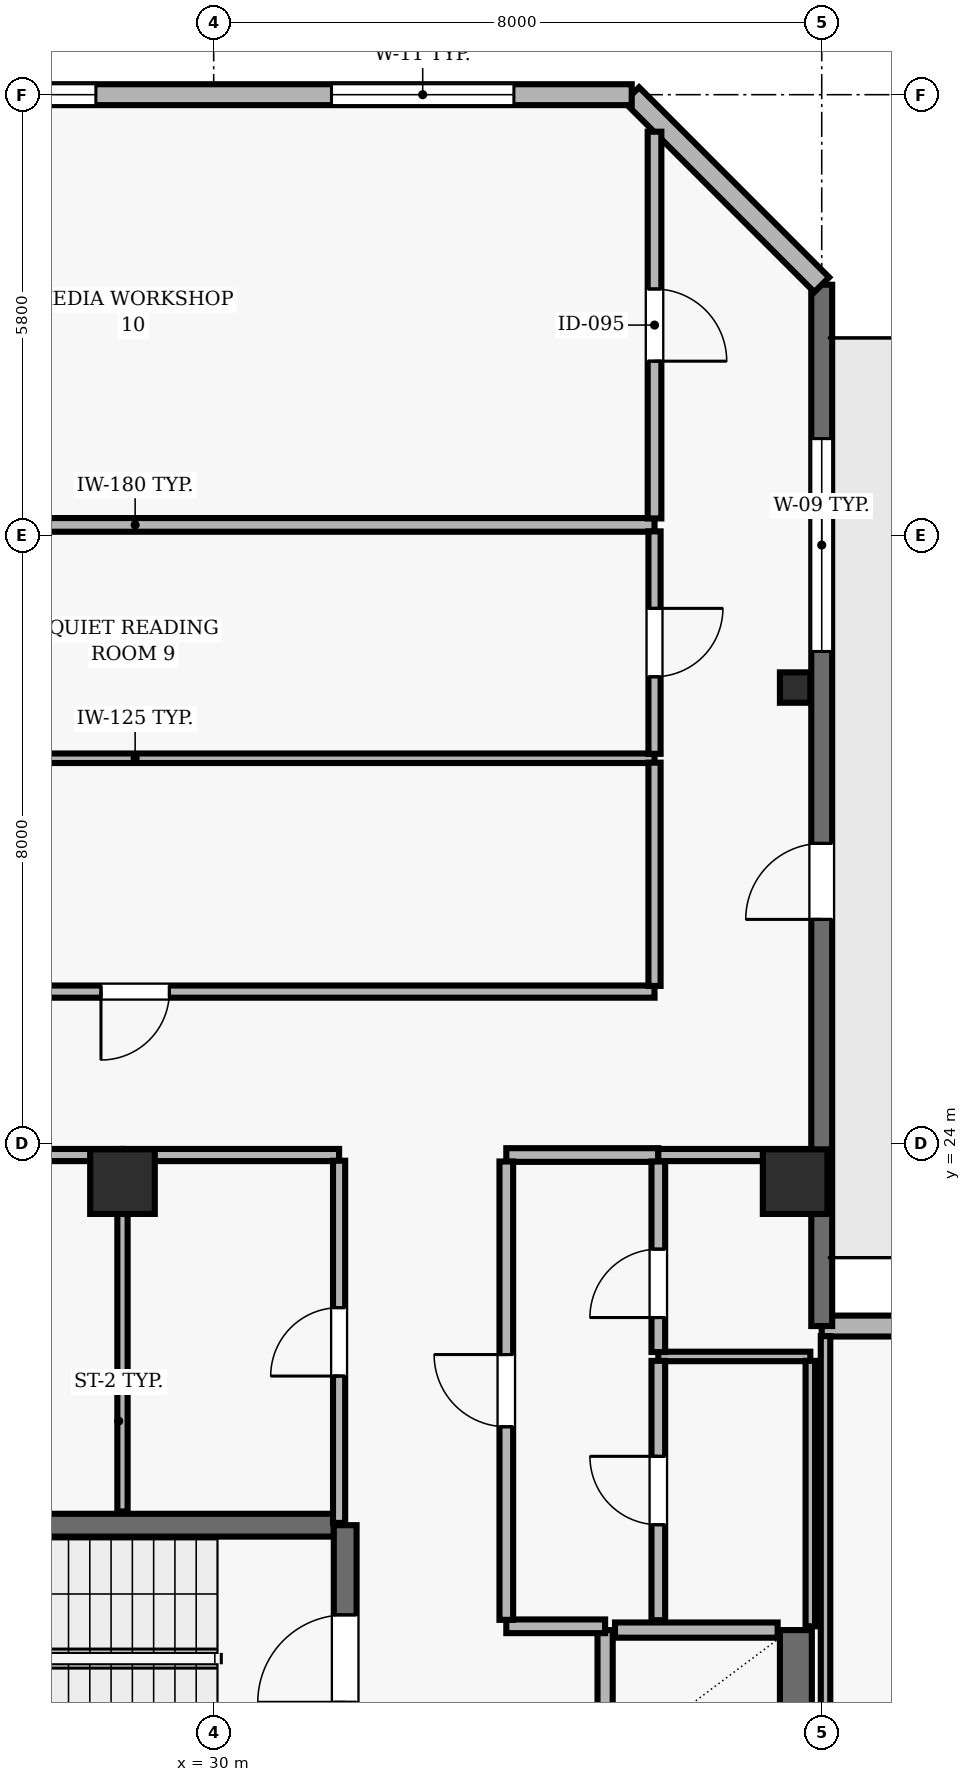
"""IFC4 building model, lengths in metres.
Left out: names, types, materials, properties, quantities, classifications, styles, units other than length and angle.
Written with IfcOpenShell. Run it as: python <this file> out.ifc"""

import sys

from ifc_helpers import new_model, si_unit, direction, frame, frame_2d, origin, origin_2d, place, context, subcontext, project, spatial, rectangle, hollow_rectangle, extrude, element, fill, save


model = new_model("IFC4")
c1 = context("Model", 3, precision=1e-05, world=origin(), true_north=direction((0.0, 1.0)))
c2 = subcontext(c1, "Body", "Model", "MODEL_VIEW")
j1 = project(units=[si_unit("LENGTHUNIT", "METRE"), si_unit("PLANEANGLEUNIT", "RADIAN")], contexts=[c1])
p1 = place(None, origin())
s1 = spatial("IfcSite", under=j1, at=p1, CompositionType="ELEMENT")
p2 = place(p1, origin())
s2 = spatial("IfcBuilding", under=s1, at=p2, CompositionType="ELEMENT")
p3 = place(p2, frame((0.0, 0.0, 295.0)))
s3 = spatial("IfcBuildingStorey", under=s2, at=p3, CompositionType="ELEMENT", Elevation=295.0)
for number, where, z_axis, x_axis in (
    (1, (28.8, 23.5, 0.0), (0.0, 0.0, 1.0), (1.0, 0.0, 0.0)),
    (2, (37.65, 23.5, 0.0), (0.0, 0.0, 1.0), (1.0, 0.0, 0.0)),
):
    element("IfcColumn", number, at=place(p3, frame(where, z_axis=z_axis, x_axis=x_axis)), inside=s3, PredefinedType="COLUMN", context=c2, shape_type="SweptSolid", body=[
        extrude(rectangle(XDim=0.85, YDim=0.85, at=origin_2d()), origin(), (0.0, 0.0, 1.0), 3.9),
    ])
p4 = place(p3, frame((37.65, 30.0, 0.0), z_axis=(0.0, 0.0, 1.0), x_axis=(1.0, 0.0, 0.0)))
e3 = element("IfcColumn", 3, at=p4, inside=s3, PredefinedType="COLUMN", context=c2, shape_type="SweptSolid", body=[
    extrude(hollow_rectangle(XDim=0.4, YDim=0.4, WallThickness=0.02, at=origin_2d()), origin(), (0.0, 0.0, 1.0), 3.9),
])
p5 = place(p3, frame((43.0, 21.6, 0.0), z_axis=(0.0, 0.0, 1.0), x_axis=(-1.0, 0.0, 0.0)))
e4 = element("IfcWall", 4, at=p5, inside=s3, PredefinedType="SOLIDWALL", context=c2, shape_type="SweptSolid", body=[
    extrude(rectangle(XDim=5.0, YDim=0.275, at=frame_2d((2.5, 0.0))), origin(), (0.0, 0.0, 1.0), 3.69),
])
p6 = place(p3, frame((38.0, 21.6, 0.0), z_axis=(0.0, 0.0, 1.0), x_axis=(0.0, 1.0, 0.0)))
e5 = element("IfcWall", 5, at=p6, inside=s3, PredefinedType="SOLIDWALL", context=c2, shape_type="SweptSolid", body=[
    extrude(rectangle(XDim=13.7, YDim=0.275, at=frame_2d((6.85, 0.0))), origin(), (0.0, 0.0, 1.0), 3.69),
])
p7 = place(p6, frame((5.35, 0.0, 0.0)))
e6 = element("IfcOpeningElement", 6, at=p7, cuts=e5, PredefinedType="OPENING", context=c2, shape_type="SweptSolid", body=[
    extrude(rectangle(XDim=1.0, YDim=2.2, at=frame_2d((0.5, 1.1))), frame((0.0, 0.147, 0.0), z_axis=(0.0, -1.0, 0.0), x_axis=(1.0, 0.0, 0.0)), (0.0, 0.0, 1.0), 0.295),
])
p8 = place(p6, frame((8.875, 0.0, 0.9)))
e7 = element("IfcOpeningElement", 7, at=p8, cuts=e5, PredefinedType="OPENING", context=c2, shape_type="SweptSolid", body=[
    extrude(rectangle(XDim=2.8, YDim=1.8, at=frame_2d((1.4, 0.9))), frame((0.0, 0.147, 0.0), z_axis=(0.0, -1.0, 0.0), x_axis=(1.0, 0.0, 0.0)), (0.0, 0.0, 1.0), 0.295),
])
p9 = place(p3, frame((38.0, 35.3, 0.0), z_axis=(0.0, 0.0, 1.0), x_axis=(-0.707106781187, 0.707106781187, 0.0)))
e8 = element("IfcWall", 8, at=p9, inside=s3, PredefinedType="SOLIDWALL", context=c2, shape_type="SweptSolid", body=[
    extrude(rectangle(XDim=3.536, YDim=0.275, at=frame_2d((1.768, 0.0))), origin(), (0.0, 0.0, 1.0), 3.69),
])
p10 = place(p3, frame((35.5, 37.8, 0.0), z_axis=(0.0, 0.0, 1.0), x_axis=(-1.0, 0.0, 0.0)))
e9 = element("IfcWall", 9, at=p10, inside=s3, PredefinedType="SOLIDWALL", context=c2, shape_type="SweptSolid", body=[
    extrude(rectangle(XDim=11.0, YDim=0.275, at=frame_2d((5.5, 0.0))), origin(), (0.0, 0.0, 1.0), 3.69),
])
p11 = place(p10, frame((1.55, 0.0, 0.9)))
e10 = element("IfcOpeningElement", 10, at=p11, cuts=e9, PredefinedType="OPENING", context=c2, shape_type="SweptSolid", body=[
    extrude(rectangle(XDim=2.4, YDim=2.2, at=frame_2d((1.2, 1.1))), frame((0.0, 0.147, 0.0), z_axis=(0.0, -1.0, 0.0), x_axis=(1.0, 0.0, 0.0)), (0.0, 0.0, 1.0), 0.295),
])
p12 = place(p10, frame((7.05, 0.0, 0.9)))
e11 = element("IfcOpeningElement", 11, at=p12, cuts=e9, PredefinedType="OPENING", context=c2, shape_type="SweptSolid", body=[
    extrude(rectangle(XDim=2.4, YDim=2.2, at=frame_2d((1.2, 1.1))), frame((0.0, 0.147, 0.0), z_axis=(0.0, -1.0, 0.0), x_axis=(1.0, 0.0, 0.0)), (0.0, 0.0, 1.0), 0.295),
])
p13 = place(p3, frame((31.58, 18.98, 0.0), z_axis=(0.0, 0.0, 1.0), x_axis=(-1.0, 0.0, 0.0)))
e12 = element("IfcWall", 12, at=p13, inside=s3, PredefinedType="SHEAR", context=c2, shape_type="SweptSolid", body=[
    extrude(rectangle(XDim=8.36, YDim=0.3, at=frame_2d((4.18, 0.0))), origin(), (0.0, 0.0, 1.0), 3.69),
])
p14 = place(p3, frame((31.73, 15.47, 0.0), z_axis=(0.0, 0.0, 1.0), x_axis=(0.0, 1.0, 0.0)))
e13 = element("IfcWall", 13, at=p14, inside=s3, PredefinedType="SHEAR", context=c2, shape_type="SweptSolid", body=[
    extrude(rectangle(XDim=3.51, YDim=0.3, at=frame_2d((1.755, 0.0))), origin(), (0.0, 0.0, 1.0), 3.69),
])
p15 = place(p14, frame((1.18, 0.0, 0.0)))
e14 = element("IfcOpeningElement", 14, at=p15, cuts=e13, PredefinedType="OPENING", context=c2, shape_type="SweptSolid", body=[
    extrude(rectangle(XDim=1.15, YDim=2.15, at=frame_2d((0.575, 1.075))), frame((0.0, 0.16, 0.0), z_axis=(0.0, -1.0, 0.0), x_axis=(1.0, 0.0, 0.0)), (0.0, 0.0, 1.0), 0.32),
])
p16 = place(p3, frame((35.15, 17.6, 0.0), z_axis=(0.0, 0.0, 1.0), x_axis=(0.0, -1.0, 0.0)))
e15 = element("IfcWall", 15, at=p16, inside=s3, PredefinedType="SOLIDWALL", context=c2, shape_type="SweptSolid", body=[
    extrude(rectangle(XDim=1.85, YDim=0.2, at=frame_2d((0.925, 0.0))), origin(), (0.0, 0.0, 1.0), 3.69),
])
p17 = place(p3, frame((37.66, 15.75, 0.0), z_axis=(0.0, 0.0, 1.0), x_axis=(0.0, 1.0, 0.0)))
e16 = element("IfcWall", 16, at=p17, inside=s3, PredefinedType="SHEAR", context=c2, shape_type="SweptSolid", body=[
    extrude(rectangle(XDim=1.85, YDim=0.42, at=frame_2d((0.925, 0.0))), origin(), (0.0, 0.0, 1.0), 3.69),
])
p18 = place(p3, frame((37.42, 17.6, 0.0), z_axis=(0.0, 0.0, 1.0), x_axis=(-1.0, 0.0, 0.0)))
e17 = element("IfcWall", 17, at=p18, inside=s3, PredefinedType="SOLIDWALL", context=c2, shape_type="SweptSolid", body=[
    extrude(rectangle(XDim=2.14, YDim=0.2, at=frame_2d((1.07, 0.0))), origin(), (0.0, 0.0, 1.0), 3.69),
])
p19 = place(p3, frame((28.8, 23.85, 0.0), z_axis=(0.0, 0.0, 1.0), x_axis=(-1.0, 0.0, 0.0)))
e18 = element("IfcWall", 18, at=p19, inside=s3, PredefinedType="PARTITIONING", context=c2, shape_type="SweptSolid", body=[
    extrude(rectangle(XDim=6.6, YDim=0.16, at=frame_2d((3.3, 0.0))), origin(), (0.0, 0.0, 1.0), 3.221),
])
p20 = place(p19, frame((2.86, 0.0, 0.0)))
e19 = element("IfcOpeningElement", 19, at=p20, cuts=e18, PredefinedType="OPENING", context=c2, shape_type="SweptSolid", body=[
    extrude(rectangle(XDim=0.88, YDim=2.1, at=frame_2d((0.44, 1.05))), frame((0.0, 0.09, 0.0), z_axis=(0.0, -1.0, 0.0), x_axis=(1.0, 0.0, 0.0)), (0.0, 0.0, 1.0), 0.18),
])
p21 = place(p3, frame((31.65, 23.85, 0.0), z_axis=(0.0, 0.0, 1.0), x_axis=(-1.0, 0.0, 0.0)))
e20 = element("IfcWall", 20, at=p21, inside=s3, PredefinedType="PARTITIONING", context=c2, shape_type="SweptSolid", body=[
    extrude(rectangle(XDim=2.85, YDim=0.16, at=frame_2d((1.425, 0.0))), origin(), (0.0, 0.0, 1.0), 3.221),
])
p22 = place(p3, frame((33.85, 17.65, 0.0), z_axis=(0.0, 0.0, 1.0), x_axis=(1.0, 0.0, 0.0)))
e21 = element("IfcWall", 21, at=p22, inside=s3, PredefinedType="PARTITIONING", context=c2, shape_type="SweptSolid", body=[
    extrude(rectangle(XDim=1.3, YDim=0.18, at=frame_2d((0.65, 0.0))), origin(), (0.0, 0.0, 1.0), 3.69),
])
p23 = place(p3, frame((35.8, 26.0, 0.0), z_axis=(0.0, 0.0, 1.0), x_axis=(-1.0, 0.0, 0.0)))
e22 = element("IfcWall", 22, at=p23, inside=s3, PredefinedType="PARTITIONING", context=c2, shape_type="SweptSolid", body=[
    extrude(rectangle(XDim=13.667, YDim=0.16, at=frame_2d((6.833, 0.0))), origin(), (0.0, 0.0, 1.0), 3.69),
])
p24 = place(p23, frame((6.383, 0.0, 0.0)))
e23 = element("IfcOpeningElement", 23, at=p24, cuts=e22, PredefinedType="OPENING", context=c2, shape_type="SweptSolid", body=[
    extrude(rectangle(XDim=0.9, YDim=2.1, at=frame_2d((0.45, 1.05))), frame((0.0, 0.09, 0.0), z_axis=(0.0, -1.0, 0.0), x_axis=(1.0, 0.0, 0.0)), (0.0, 0.0, 1.0), 0.18),
])
p25 = place(p3, frame((35.8, 29.07, 0.0), z_axis=(0.0, 0.0, 1.0), x_axis=(-1.0, 0.0, 0.0)))
e24 = element("IfcWall", 24, at=p25, inside=s3, PredefinedType="PARTITIONING", context=c2, shape_type="SweptSolid", body=[
    extrude(rectangle(XDim=13.667, YDim=0.125, at=frame_2d((6.833, 0.0))), origin(), (0.0, 0.0, 1.0), 3.69),
])
p26 = place(p3, frame((35.8, 32.14, 0.0), z_axis=(0.0, 0.0, 1.0), x_axis=(-1.0, 0.0, 0.0)))
e25 = element("IfcWall", 25, at=p26, inside=s3, PredefinedType="PARTITIONING", context=c2, shape_type="SweptSolid", body=[
    extrude(rectangle(XDim=13.667, YDim=0.18, at=frame_2d((6.833, 0.0))), origin(), (0.0, 0.0, 1.0), 3.69),
])
p27 = place(p3, frame((35.85, 21.2, 0.0), z_axis=(0.0, 0.0, 1.0), x_axis=(1.0, 0.0, 0.0)))
e26 = element("IfcWall", 26, at=p27, inside=s3, PredefinedType="PARTITIONING", context=c2, shape_type="SweptSolid", body=[
    extrude(rectangle(XDim=2.0, YDim=0.125, at=frame_2d((1.0, 0.0))), origin(), (0.0, 0.0, 1.0), 3.69),
])
p28 = place(p3, frame((35.85, 23.85, 0.0), z_axis=(0.0, 0.0, 1.0), x_axis=(-1.0, 0.0, 0.0)))
e27 = element("IfcWall", 27, at=p28, inside=s3, PredefinedType="PARTITIONING", context=c2, shape_type="SweptSolid", body=[
    extrude(rectangle(XDim=2.0, YDim=0.18, at=frame_2d((1.0, 0.0))), origin(), (0.0, 0.0, 1.0), 3.221),
])
p29 = place(p3, frame((37.85, 23.85, 0.0), z_axis=(0.0, 0.0, 1.0), x_axis=(-1.0, 0.0, 0.0)))
e28 = element("IfcWall", 28, at=p29, inside=s3, PredefinedType="PARTITIONING", context=c2, shape_type="SweptSolid", body=[
    extrude(rectangle(XDim=2.0, YDim=0.16, at=frame_2d((1.0, 0.0))), origin(), (0.0, 0.0, 1.0), 3.221),
])
p30 = place(p3, frame((28.8, 23.775, 0.0), z_axis=(0.0, 0.0, 1.0), x_axis=(0.0, -1.0, 0.0)))
e29 = element("IfcWall", 29, at=p30, inside=s3, PredefinedType="PARTITIONING", context=c2, shape_type="SweptSolid", body=[
    extrude(rectangle(XDim=4.615, YDim=0.135, at=frame_2d((2.308, 0.0))), origin(), (0.0, 0.0, 1.0), 3.69),
])
p31 = place(p3, frame((31.65, 19.01, 0.0), z_axis=(0.0, 0.0, 1.0), x_axis=(0.0, 1.0, 0.0)))
e30 = element("IfcWall", 30, at=p31, inside=s3, PredefinedType="PARTITIONING", context=c2, shape_type="SweptSolid", body=[
    extrude(rectangle(XDim=4.765, YDim=0.16, at=frame_2d((2.382, 0.0))), origin(), (0.0, 0.0, 1.0), 3.69),
])
p32 = place(p31, frame((1.932, 0.0, 0.0)))
e31 = element("IfcOpeningElement", 31, at=p32, cuts=e30, PredefinedType="OPENING", context=c2, shape_type="SweptSolid", body=[
    extrude(rectangle(XDim=0.9, YDim=2.1, at=frame_2d((0.45, 1.05))), frame((0.0, 0.09, 0.0), z_axis=(0.0, -1.0, 0.0), x_axis=(1.0, 0.0, 0.0)), (0.0, 0.0, 1.0), 0.18),
])
p33 = place(p3, frame((33.85, 17.735, 0.0), z_axis=(0.0, 0.0, 1.0), x_axis=(0.0, 1.0, 0.0)))
e32 = element("IfcWall", 32, at=p33, inside=s3, PredefinedType="PARTITIONING", context=c2, shape_type="SweptSolid", body=[
    extrude(rectangle(XDim=6.03, YDim=0.18, at=frame_2d((3.015, 0.0))), origin(), (0.0, 0.0, 1.0), 3.69),
])
p34 = place(p33, frame((2.54, 0.0, 0.0)))
e33 = element("IfcOpeningElement", 33, at=p34, cuts=e32, PredefinedType="OPENING", context=c2, shape_type="SweptSolid", body=[
    extrude(rectangle(XDim=0.95, YDim=2.1, at=frame_2d((0.475, 1.05))), frame((0.0, 0.1, 0.0), z_axis=(0.0, -1.0, 0.0), x_axis=(1.0, 0.0, 0.0)), (0.0, 0.0, 1.0), 0.2),
])
p35 = place(p3, frame((35.8, 29.012, 0.0), z_axis=(0.0, 0.0, 1.0), x_axis=(0.0, -1.0, 0.0)))
e34 = element("IfcWall", 34, at=p35, inside=s3, PredefinedType="PARTITIONING", context=c2, shape_type="SweptSolid", body=[
    extrude(rectangle(XDim=2.937, YDim=0.16, at=frame_2d((1.469, 0.0))), origin(), (0.0, 0.0, 1.0), 3.69),
])
p36 = place(p3, frame((35.8, 32.055, 0.0), z_axis=(0.0, 0.0, 1.0), x_axis=(0.0, -1.0, 0.0)))
e35 = element("IfcWall", 35, at=p36, inside=s3, PredefinedType="PARTITIONING", context=c2, shape_type="SweptSolid", body=[
    extrude(rectangle(XDim=2.927, YDim=0.16, at=frame_2d((1.463, 0.0))), origin(), (0.0, 0.0, 1.0), 3.69),
])
p37 = place(p36, frame((1.013, 0.0, 0.0)))
e36 = element("IfcOpeningElement", 36, at=p37, cuts=e35, PredefinedType="OPENING", context=c2, shape_type="SweptSolid", body=[
    extrude(rectangle(XDim=0.9, YDim=2.1, at=frame_2d((0.45, 1.05))), frame((0.0, 0.09, 0.0), z_axis=(0.0, -1.0, 0.0), x_axis=(1.0, 0.0, 0.0)), (0.0, 0.0, 1.0), 0.18),
])
p38 = place(p3, frame((35.8, 37.313, 0.0), z_axis=(0.0, 0.0, 1.0), x_axis=(0.0, -1.0, 0.0)))
e37 = element("IfcWall", 37, at=p38, inside=s3, PredefinedType="PARTITIONING", context=c2, shape_type="SweptSolid", body=[
    extrude(rectangle(XDim=5.088, YDim=0.18, at=frame_2d((2.544, 0.0))), origin(), (0.0, 0.0, 1.0), 3.69),
])
p39 = place(p38, frame((2.069, 0.0, 0.0)))
e38 = element("IfcOpeningElement", 38, at=p39, cuts=e37, PredefinedType="OPENING", context=c2, shape_type="SweptSolid", body=[
    extrude(rectangle(XDim=0.95, YDim=2.1, at=frame_2d((0.475, 1.05))), frame((0.0, 0.1, 0.0), z_axis=(0.0, -1.0, 0.0), x_axis=(1.0, 0.0, 0.0)), (0.0, 0.0, 1.0), 0.2),
])
p40 = place(p3, frame((35.85, 17.73, 0.0), z_axis=(0.0, 0.0, 1.0), x_axis=(0.0, 1.0, 0.0)))
e39 = element("IfcWall", 39, at=p40, inside=s3, PredefinedType="PARTITIONING", context=c2, shape_type="SweptSolid", body=[
    extrude(rectangle(XDim=3.412, YDim=0.18, at=frame_2d((1.706, 0.0))), origin(), (0.0, 0.0, 1.0), 3.69),
])
p41 = place(p40, frame((1.256, 0.0, 0.0)))
e40 = element("IfcOpeningElement", 40, at=p41, cuts=e39, PredefinedType="OPENING", context=c2, shape_type="SweptSolid", body=[
    extrude(rectangle(XDim=0.9, YDim=2.1, at=frame_2d((0.45, 1.05))), frame((0.0, 0.1, 0.0), z_axis=(0.0, -1.0, 0.0), x_axis=(1.0, 0.0, 0.0)), (0.0, 0.0, 1.0), 0.2),
])
p42 = place(p3, frame((35.85, 21.258, 0.0), z_axis=(0.0, 0.0, 1.0), x_axis=(0.0, 1.0, 0.0)))
e41 = element("IfcWall", 41, at=p42, inside=s3, PredefinedType="PARTITIONING", context=c2, shape_type="SweptSolid", body=[
    extrude(rectangle(XDim=2.507, YDim=0.18, at=frame_2d((1.253, 0.0))), origin(), (0.0, 0.0, 1.0), 3.69),
])
p43 = place(p42, frame((0.454, 0.0, 0.0)))
e42 = element("IfcOpeningElement", 42, at=p43, cuts=e41, PredefinedType="OPENING", context=c2, shape_type="SweptSolid", body=[
    extrude(rectangle(XDim=0.9, YDim=2.1, at=frame_2d((0.45, 1.05))), frame((0.0, 0.1, 0.0), z_axis=(0.0, -1.0, 0.0), x_axis=(1.0, 0.0, 0.0)), (0.0, 0.0, 1.0), 0.2),
])
p44 = place(p3, frame((37.85, 17.65, 0.0), z_axis=(0.0, 0.0, 1.0), x_axis=(0.0, 1.0, 0.0)))
e43 = element("IfcWall", 43, at=p44, inside=s3, PredefinedType="PARTITIONING", context=c2, shape_type="SweptSolid", body=[
    extrude(rectangle(XDim=3.492, YDim=0.125, at=frame_2d((1.746, 0.0))), origin(), (0.0, 0.0, 1.0), 3.221),
])
p45 = place(p3, frame((38.05, 21.468, 0.0), z_axis=(0.0, 0.0, 1.0), x_axis=(0.0, -1.0, 0.0)))
e44 = element("IfcWall", 44, at=p45, inside=s3, PredefinedType="PARTITIONING", context=c2, shape_type="SweptSolid", body=[
    extrude(rectangle(XDim=5.393, YDim=0.125, at=frame_2d((2.697, 0.0))), origin(), (0.0, 0.0, 1.0), 3.221),
])
p46 = place(p7, origin())
e45 = element("IfcDoor", 45, at=p46, inside=s3, OperationType="SINGLE_SWING_LEFT", PredefinedType="DOOR", context=c2, shape_type="SweptSolid", body=[
    extrude(rectangle(XDim=1.0, YDim=2.2, at=frame_2d((0.5, 1.1))), frame((0.0, 0.025, 0.0), z_axis=(0.0, -1.0, 0.0), x_axis=(1.0, 0.0, 0.0)), (0.0, 0.0, 1.0), 0.05),
])
fill(e6, e45)
p47 = place(p8, origin())
e46 = element("IfcWindow", 46, at=p47, inside=s3, PartitioningType="SINGLE_PANEL", PredefinedType="WINDOW", context=c2, shape_type="SweptSolid", body=[
    extrude(rectangle(XDim=2.8, YDim=1.8, at=frame_2d((1.4, 0.9))), frame((0.0, 0.03, 0.0), z_axis=(0.0, -1.0, 0.0), x_axis=(1.0, 0.0, 0.0)), (0.0, 0.0, 1.0), 0.06),
])
fill(e7, e46)
p48 = place(p11, origin())
e47 = element("IfcWindow", 47, at=p48, inside=s3, PartitioningType="SINGLE_PANEL", PredefinedType="WINDOW", context=c2, shape_type="SweptSolid", body=[
    extrude(rectangle(XDim=2.4, YDim=2.2, at=frame_2d((1.2, 1.1))), frame((0.0, 0.03, 0.0), z_axis=(0.0, -1.0, 0.0), x_axis=(1.0, 0.0, 0.0)), (0.0, 0.0, 1.0), 0.06),
])
fill(e10, e47)
p49 = place(p12, origin())
e48 = element("IfcWindow", 48, at=p49, inside=s3, PartitioningType="SINGLE_PANEL", PredefinedType="WINDOW", context=c2, shape_type="SweptSolid", body=[
    extrude(rectangle(XDim=2.4, YDim=2.2, at=frame_2d((1.2, 1.1))), frame((0.0, 0.03, 0.0), z_axis=(0.0, -1.0, 0.0), x_axis=(1.0, 0.0, 0.0)), (0.0, 0.0, 1.0), 0.06),
])
fill(e11, e48)
p50 = place(p15, origin())
e49 = element("IfcDoor", 49, at=p50, inside=s3, OperationType="SINGLE_SWING_LEFT", PredefinedType="DOOR", context=c2, shape_type="SweptSolid", body=[
    extrude(rectangle(XDim=1.15, YDim=2.15, at=frame_2d((0.575, 1.075))), frame((0.0, 0.025, 0.0), z_axis=(0.0, -1.0, 0.0), x_axis=(1.0, 0.0, 0.0)), (0.0, 0.0, 1.0), 0.05),
])
fill(e14, e49)
p51 = place(p34, origin())
e50 = element("IfcDoor", 50, at=p51, inside=s3, OperationType="SINGLE_SWING_RIGHT", PredefinedType="DOOR", context=c2, shape_type="SweptSolid", body=[
    extrude(rectangle(XDim=0.95, YDim=2.1, at=frame_2d((0.475, 1.05))), frame((0.0, 0.025, 0.0), z_axis=(0.0, -1.0, 0.0), x_axis=(1.0, 0.0, 0.0)), (0.0, 0.0, 1.0), 0.05),
])
fill(e33, e50)
p52 = place(p43, origin())
e51 = element("IfcDoor", 51, at=p52, inside=s3, OperationType="SINGLE_SWING_LEFT", PredefinedType="DOOR", context=c2, shape_type="SweptSolid", body=[
    extrude(rectangle(XDim=0.9, YDim=2.1, at=frame_2d((0.45, 1.05))), frame((0.0, 0.025, 0.0), z_axis=(0.0, -1.0, 0.0), x_axis=(1.0, 0.0, 0.0)), (0.0, 0.0, 1.0), 0.05),
])
fill(e42, e51)
p53 = place(p41, origin())
e52 = element("IfcDoor", 52, at=p53, inside=s3, OperationType="SINGLE_SWING_RIGHT", PredefinedType="DOOR", context=c2, shape_type="SweptSolid", body=[
    extrude(rectangle(XDim=0.9, YDim=2.1, at=frame_2d((0.45, 1.05))), frame((0.0, 0.025, 0.0), z_axis=(0.0, -1.0, 0.0), x_axis=(1.0, 0.0, 0.0)), (0.0, 0.0, 1.0), 0.05),
])
fill(e40, e52)
p54 = place(p32, origin())
e53 = element("IfcDoor", 53, at=p54, inside=s3, OperationType="SINGLE_SWING_LEFT", PredefinedType="DOOR", context=c2, shape_type="SweptSolid", body=[
    extrude(rectangle(XDim=0.9, YDim=2.1, at=frame_2d((0.45, 1.05))), frame((0.0, 0.025, 0.0), z_axis=(0.0, -1.0, 0.0), x_axis=(1.0, 0.0, 0.0)), (0.0, 0.0, 1.0), 0.05),
])
fill(e31, e53)
p55 = place(p24, origin())
e54 = element("IfcDoor", 54, at=p55, inside=s3, OperationType="SINGLE_SWING_RIGHT", PredefinedType="DOOR", context=c2, shape_type="SweptSolid", body=[
    extrude(rectangle(XDim=0.9, YDim=2.1, at=frame_2d((0.45, 1.05))), frame((0.0, 0.025, 0.0), z_axis=(0.0, -1.0, 0.0), x_axis=(1.0, 0.0, 0.0)), (0.0, 0.0, 1.0), 0.05),
])
fill(e23, e54)
p56 = place(p37, origin())
e55 = element("IfcDoor", 55, at=p56, inside=s3, OperationType="SINGLE_SWING_LEFT", PredefinedType="DOOR", context=c2, shape_type="SweptSolid", body=[
    extrude(rectangle(XDim=0.9, YDim=2.1, at=frame_2d((0.45, 1.05))), frame((0.0, 0.025, 0.0), z_axis=(0.0, -1.0, 0.0), x_axis=(1.0, 0.0, 0.0)), (0.0, 0.0, 1.0), 0.05),
])
fill(e36, e55)
p57 = place(p39, origin())
e56 = element("IfcDoor", 56, at=p57, inside=s3, OperationType="SINGLE_SWING_RIGHT", PredefinedType="DOOR", context=c2, shape_type="SweptSolid", body=[
    extrude(rectangle(XDim=0.95, YDim=2.1, at=frame_2d((0.475, 1.05))), frame((0.0, 0.025, 0.0), z_axis=(0.0, -1.0, 0.0), x_axis=(1.0, 0.0, 0.0)), (0.0, 0.0, 1.0), 0.05),
])
fill(e38, e56)
save(model, sys.argv[1])
